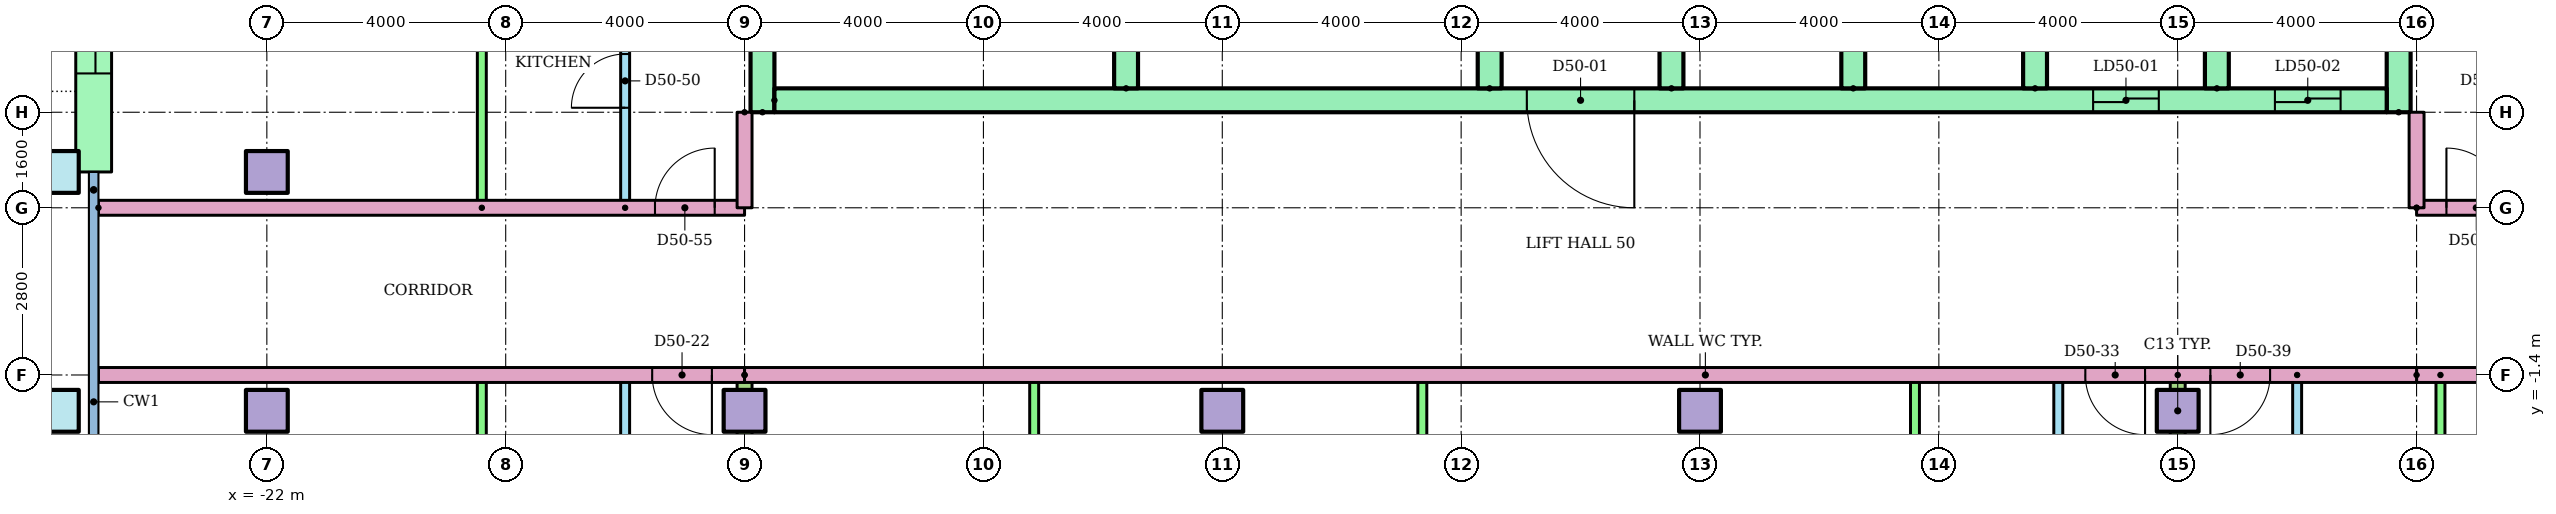
"""IFC4 building model, lengths in metres.
Left out: names, types, materials, properties, quantities, classifications, styles, units other than length and angle.
Written with IfcOpenShell. Run it as: python <this file> out.ifc"""

import sys

from ifc_helpers import new_model, si_unit, direction, frame, frame_2d, origin, origin_2d, place, context, subcontext, project, spatial, rectangle, hollow_rectangle, extrude, element, fill, save


model = new_model("IFC4")
c1 = context("Model", 3, precision=1e-05, world=origin(), true_north=direction((0.0, 1.0)))
c2 = subcontext(c1, "Body", "Model", "MODEL_VIEW")
j1 = project(units=[si_unit("LENGTHUNIT", "METRE"), si_unit("PLANEANGLEUNIT", "RADIAN")], contexts=[c1])
p1 = place(None, origin())
s1 = spatial("IfcSite", under=j1, at=p1, CompositionType="ELEMENT")
p2 = place(p1, origin())
s2 = spatial("IfcBuilding", under=s1, at=p2, CompositionType="ELEMENT")
p3 = place(p2, frame((0.0, 0.0, 190.9)))
s3 = spatial("IfcBuildingStorey", under=s2, at=p3, CompositionType="ELEMENT", Elevation=190.9)
p4 = place(p3, frame((-25.5, -2.0, 0.0)))
e1 = element("IfcColumn", 1, at=p4, inside=s3, PredefinedType="COLUMN", context=c2, shape_type="SweptSolid", body=[
    extrude(hollow_rectangle(XDim=0.7, YDim=0.7, WallThickness=0.036, at=origin_2d()), origin(), (0.0, 0.0, 1.0), 3.2),
])
for number, where in (
    (2, (-22.0, -2.0, 0.0)),
    (3, (-14.0, -2.0, 0.0)),
    (4, (-6.0, -2.0, 0.0)),
    (5, (2.0, -2.0, 0.0)),
    (6, (10.0, -2.0, 0.0)),
):
    element("IfcColumn", number, at=place(p3, frame(where)), inside=s3, PredefinedType="COLUMN", context=c2, shape_type="SweptSolid", body=[
        extrude(rectangle(XDim=0.7, YDim=0.7, at=origin_2d()), origin(), (0.0, 0.0, 1.0), 3.2),
    ])
p5 = place(p3, frame((-25.5, 2.0, 0.0)))
e7 = element("IfcColumn", 7, at=p5, inside=s3, PredefinedType="COLUMN", context=c2, shape_type="SweptSolid", body=[
    extrude(hollow_rectangle(XDim=0.7, YDim=0.7, WallThickness=0.036, at=origin_2d()), origin(), (0.0, 0.0, 1.0), 3.2),
])
p6 = place(p3, frame((-22.0, 2.0, 0.0)))
e8 = element("IfcColumn", 8, at=p6, inside=s3, PredefinedType="COLUMN", context=c2, shape_type="SweptSolid", body=[
    extrude(rectangle(XDim=0.7, YDim=0.7, at=origin_2d()), origin(), (0.0, 0.0, 1.0), 3.2),
])
p7 = place(p3, frame((-24.9, 6.5, 0.0), z_axis=(0.0, 0.0, 1.0), x_axis=(0.0, -1.0, 0.0)))
e9 = element("IfcWall", 9, at=p7, inside=s3, PredefinedType="STANDARD", context=c2, shape_type="SweptSolid", body=[
    extrude(rectangle(XDim=4.5, YDim=0.6, at=frame_2d((2.25, 0.0))), origin(), (0.0, 0.0, 1.0), 2.8),
])
p8 = place(p7, frame((1.65, 0.0, 0.0)))
e10 = element("IfcOpeningElement", 10, at=p8, cuts=e9, PredefinedType="OPENING", context=c2, shape_type="SweptSolid", body=[
    extrude(rectangle(XDim=1.2, YDim=2.1, at=frame_2d((0.6, 1.05))), frame((0.0, 0.31, 0.0), z_axis=(0.0, -1.0, 0.0), x_axis=(1.0, 0.0, 0.0)), (0.0, 0.0, 1.0), 0.62),
])
for number, where, z_axis, x_axis in (
    (11, (-13.7, 3.0, 0.0), (0.0, 0.0, 1.0), (0.0, 1.0, 0.0)),
    (12, (13.7, 3.0, 0.0), (0.0, 0.0, 1.0), (0.0, 1.0, 0.0)),
):
    element("IfcWall", number, at=place(p3, frame(where, z_axis=z_axis, x_axis=x_axis)), inside=s3, PredefinedType="SHEAR", context=c2, shape_type="SweptSolid", body=[
        extrude(rectangle(XDim=17.0, YDim=0.4, at=frame_2d((8.5, 0.0))), origin(), (0.0, 0.0, 1.0), 2.8),
    ])
p9 = place(p3, frame((-13.5, 3.2, 0.0)))
e13 = element("IfcWall", 13, at=p9, inside=s3, PredefinedType="SHEAR", context=c2, shape_type="SweptSolid", body=[
    extrude(rectangle(XDim=27.0, YDim=0.4, at=frame_2d((13.5, 0.0))), origin(), (0.0, 0.0, 1.0), 2.8),
])
p10 = place(p9, frame((22.083, 0.0, 0.0)))
e14 = element("IfcOpeningElement", 14, at=p10, cuts=e13, PredefinedType="OPENING", context=c2, shape_type="SweptSolid", body=[
    extrude(rectangle(XDim=1.1, YDim=2.1, at=frame_2d((0.55, 1.05))), frame((0.0, 0.21, 0.0), z_axis=(0.0, -1.0, 0.0), x_axis=(1.0, 0.0, 0.0)), (0.0, 0.0, 1.0), 0.42),
])
p11 = place(p9, frame((25.128, 0.0, 0.0)))
e15 = element("IfcOpeningElement", 15, at=p11, cuts=e13, PredefinedType="OPENING", context=c2, shape_type="SweptSolid", body=[
    extrude(rectangle(XDim=1.1, YDim=2.1, at=frame_2d((0.55, 1.05))), frame((0.0, 0.21, 0.0), z_axis=(0.0, -1.0, 0.0), x_axis=(1.0, 0.0, 0.0)), (0.0, 0.0, 1.0), 0.42),
])
p12 = place(p9, frame((12.6, 0.0, 0.0)))
e16 = element("IfcOpeningElement", 16, at=p12, cuts=e13, PredefinedType="OPENING", context=c2, shape_type="SweptSolid", body=[
    extrude(rectangle(XDim=1.8, YDim=2.1, at=frame_2d((0.9, 1.05))), frame((0.0, 0.21, 0.0), z_axis=(0.0, -1.0, 0.0), x_axis=(1.0, 0.0, 0.0)), (0.0, 0.0, 1.0), 0.42),
])
for number, where, z_axis, x_axis in (
    (17, (-7.611, 3.4, 0.0), (0.0, 0.0, 1.0), (0.0, 1.0, 0.0)),
    (18, (-1.522, 3.4, 0.0), (0.0, 0.0, 1.0), (0.0, 1.0, 0.0)),
    (19, (1.522, 3.4, 0.0), (0.0, 0.0, 1.0), (0.0, 1.0, 0.0)),
    (20, (4.567, 3.4, 0.0), (0.0, 0.0, 1.0), (0.0, 1.0, 0.0)),
    (21, (7.611, 3.4, 0.0), (0.0, 0.0, 1.0), (0.0, 1.0, 0.0)),
    (22, (10.656, 3.4, 0.0), (0.0, 0.0, 1.0), (0.0, 1.0, 0.0)),
):
    element("IfcWall", number, at=place(p3, frame(where, z_axis=z_axis, x_axis=x_axis)), inside=s3, PredefinedType="SHEAR", context=c2, shape_type="SweptSolid", body=[
        extrude(rectangle(XDim=3.0, YDim=0.4, at=frame_2d((1.5, 0.0))), origin(), (0.0, 0.0, 1.0), 2.8),
    ])
p13 = place(p3, frame((-16.0, -6.9, 0.0), z_axis=(0.0, 0.0, 1.0), x_axis=(0.0, 1.0, 0.0)))
e23 = element("IfcWall", 23, at=p13, inside=s3, PredefinedType="PARTITIONING", context=c2, shape_type="SweptSolid", body=[
    extrude(rectangle(XDim=5.5, YDim=0.15, at=frame_2d((2.75, 0.0))), origin(), (0.0, 0.0, 1.0), 2.4),
])
p14 = place(p13, frame((3.55, 0.0, 0.0)))
e24 = element("IfcOpeningElement", 24, at=p14, cuts=e23, PredefinedType="OPENING", context=c2, shape_type="SweptSolid", body=[
    extrude(rectangle(XDim=0.9, YDim=2.1, at=frame_2d((0.45, 1.05))), frame((0.0, 0.085, 0.0), z_axis=(0.0, -1.0, 0.0), x_axis=(1.0, 0.0, 0.0)), (0.0, 0.0, 1.0), 0.17),
])
p15 = place(p13, frame((0.85, 0.0, 0.0)))
e25 = element("IfcOpeningElement", 25, at=p15, cuts=e23, PredefinedType="OPENING", context=c2, shape_type="SweptSolid", body=[
    extrude(rectangle(XDim=0.8, YDim=2.1, at=frame_2d((0.4, 1.05))), frame((0.0, 0.085, 0.0), z_axis=(0.0, -1.0, 0.0), x_axis=(1.0, 0.0, 0.0)), (0.0, 0.0, 1.0), 0.17),
])
p16 = place(p3, frame((-18.4, -6.9, 0.0), z_axis=(0.0, 0.0, 1.0), x_axis=(0.0, 1.0, 0.0)))
e26 = element("IfcWall", 26, at=p16, inside=s3, PredefinedType="PARTITIONING", context=c2, shape_type="SweptSolid", body=[
    extrude(rectangle(XDim=5.5, YDim=0.15, at=frame_2d((2.75, 0.0))), origin(), (0.0, 0.0, 1.0), 2.4),
])
p17 = place(p3, frame((8.0, -6.9, 0.0), z_axis=(0.0, 0.0, 1.0), x_axis=(0.0, 1.0, 0.0)))
e27 = element("IfcWall", 27, at=p17, inside=s3, PredefinedType="PARTITIONING", context=c2, shape_type="SweptSolid", body=[
    extrude(rectangle(XDim=5.5, YDim=0.15, at=frame_2d((2.75, 0.0))), origin(), (0.0, 0.0, 1.0), 2.4),
])
p18 = place(p17, frame((3.55, 0.0, 0.0)))
e28 = element("IfcOpeningElement", 28, at=p18, cuts=e27, PredefinedType="OPENING", context=c2, shape_type="SweptSolid", body=[
    extrude(rectangle(XDim=0.9, YDim=2.1, at=frame_2d((0.45, 1.05))), frame((0.0, 0.085, 0.0), z_axis=(0.0, -1.0, 0.0), x_axis=(1.0, 0.0, 0.0)), (0.0, 0.0, 1.0), 0.17),
])
p19 = place(p17, frame((0.85, 0.0, 0.0)))
e29 = element("IfcOpeningElement", 29, at=p19, cuts=e27, PredefinedType="OPENING", context=c2, shape_type="SweptSolid", body=[
    extrude(rectangle(XDim=0.8, YDim=2.1, at=frame_2d((0.4, 1.05))), frame((0.0, 0.085, 0.0), z_axis=(0.0, -1.0, 0.0), x_axis=(1.0, 0.0, 0.0)), (0.0, 0.0, 1.0), 0.17),
])
for number, where, z_axis, x_axis in (
    (30, (5.6, -6.9, 0.0), (0.0, 0.0, 1.0), (0.0, 1.0, 0.0)),
    (31, (-2.65, -6.9, 0.0), (0.0, 0.0, 1.0), (0.0, 1.0, 0.0)),
    (32, (-9.15, -6.9, 0.0), (0.0, 0.0, 1.0), (0.0, 1.0, 0.0)),
):
    element("IfcWall", number, at=place(p3, frame(where, z_axis=z_axis, x_axis=x_axis)), inside=s3, PredefinedType="PARTITIONING", context=c2, shape_type="SweptSolid", body=[
        extrude(rectangle(XDim=5.5, YDim=0.15, at=frame_2d((2.75, 0.0))), origin(), (0.0, 0.0, 1.0), 2.4),
    ])
p20 = place(p3, frame((-14.0, -1.4, 0.0), z_axis=(0.0, 0.0, 1.0), x_axis=(0.0, -1.0, 0.0)))
e33 = element("IfcWall", 33, at=p20, inside=s3, PredefinedType="PARTITIONING", context=c2, shape_type="SweptSolid", body=[
    extrude(rectangle(XDim=15.01, YDim=0.25, at=frame_2d((7.505, 0.0))), origin(), (0.0, 0.0, 1.0), 2.4),
])
p21 = place(p3, frame((12.0, -1.4, 0.0), z_axis=(0.0, 0.0, 1.0), x_axis=(0.0, -1.0, 0.0)))
e34 = element("IfcWall", 34, at=p21, inside=s3, PredefinedType="PARTITIONING", context=c2, shape_type="SweptSolid", body=[
    extrude(rectangle(XDim=5.5, YDim=0.15, at=frame_2d((2.75, 0.0))), origin(), (0.0, 0.0, 1.0), 2.4),
])
p22 = place(p21, frame((1.05, 0.0, 0.0)))
e35 = element("IfcOpeningElement", 35, at=p22, cuts=e34, PredefinedType="OPENING", context=c2, shape_type="SweptSolid", body=[
    extrude(rectangle(XDim=0.9, YDim=2.1, at=frame_2d((0.45, 1.05))), frame((0.0, 0.085, 0.0), z_axis=(0.0, -1.0, 0.0), x_axis=(1.0, 0.0, 0.0)), (0.0, 0.0, 1.0), 0.17),
])
p23 = place(p21, frame((3.85, 0.0, 0.0)))
e36 = element("IfcOpeningElement", 36, at=p23, cuts=e34, PredefinedType="OPENING", context=c2, shape_type="SweptSolid", body=[
    extrude(rectangle(XDim=0.8, YDim=2.1, at=frame_2d((0.4, 1.05))), frame((0.0, 0.085, 0.0), z_axis=(0.0, -1.0, 0.0), x_axis=(1.0, 0.0, 0.0)), (0.0, 0.0, 1.0), 0.17),
])
p24 = place(p3, frame((14.4, -1.4, 0.0), z_axis=(0.0, 0.0, 1.0), x_axis=(0.0, -1.0, 0.0)))
e37 = element("IfcWall", 37, at=p24, inside=s3, PredefinedType="PARTITIONING", context=c2, shape_type="SweptSolid", body=[
    extrude(rectangle(XDim=5.5, YDim=0.15, at=frame_2d((2.75, 0.0))), origin(), (0.0, 0.0, 1.0), 2.4),
])
p25 = place(p3, frame((10.0, -1.4, 0.0), z_axis=(0.0, 0.0, 1.0), x_axis=(0.0, -1.0, 0.0)))
e38 = element("IfcWall", 38, at=p25, inside=s3, PredefinedType="PARTITIONING", context=c2, shape_type="SweptSolid", body=[
    extrude(rectangle(XDim=15.01, YDim=0.25, at=frame_2d((7.505, 0.0))), origin(), (0.0, 0.0, 1.0), 2.4),
])
p26 = place(p3, frame((-14.0, -1.4, 0.0), z_axis=(0.0, 0.0, 1.0), x_axis=(-1.0, 0.0, 0.0)))
e39 = element("IfcWall", 39, at=p26, inside=s3, PredefinedType="PARTITIONING", context=c2, shape_type="SweptSolid", body=[
    extrude(rectangle(XDim=10.82, YDim=0.25, at=frame_2d((5.41, 0.0))), origin(), (0.0, 0.0, 1.0), 2.4),
])
p27 = place(p26, frame((0.547, 0.0, 0.0)))
e40 = element("IfcOpeningElement", 40, at=p27, cuts=e39, PredefinedType="OPENING", context=c2, shape_type="SweptSolid", body=[
    extrude(rectangle(XDim=1.0, YDim=2.1, at=frame_2d((0.5, 1.05))), frame((0.0, 0.135, 0.0), z_axis=(0.0, -1.0, 0.0), x_axis=(1.0, 0.0, 0.0)), (0.0, 0.0, 1.0), 0.27),
])
p28 = place(p3, frame((29.0, -1.4, 0.0), z_axis=(0.0, 0.0, 1.0), x_axis=(-1.0, 0.0, 0.0)))
e41 = element("IfcWall", 41, at=p28, inside=s3, PredefinedType="PARTITIONING", context=c2, shape_type="SweptSolid", body=[
    extrude(rectangle(XDim=15.0, YDim=0.25, at=frame_2d((7.5, 0.0))), origin(), (0.0, 0.0, 1.0), 2.4),
])
p29 = place(p28, frame((9.453, 0.0, 0.0)))
e42 = element("IfcOpeningElement", 42, at=p29, cuts=e41, PredefinedType="OPENING", context=c2, shape_type="SweptSolid", body=[
    extrude(rectangle(XDim=1.0, YDim=2.1, at=frame_2d((0.5, 1.05))), frame((0.0, 0.135, 0.0), z_axis=(0.0, -1.0, 0.0), x_axis=(1.0, 0.0, 0.0)), (0.0, 0.0, 1.0), 0.27),
])
p30 = place(p3, frame((-16.0, 1.4, 0.0), z_axis=(0.0, 0.0, 1.0), x_axis=(0.0, 1.0, 0.0)))
e43 = element("IfcWall", 43, at=p30, inside=s3, PredefinedType="PARTITIONING", context=c2, shape_type="SweptSolid", body=[
    extrude(rectangle(XDim=7.9, YDim=0.15, at=frame_2d((3.95, 0.0))), origin(), (0.0, 0.0, 1.0), 2.4),
])
p31 = place(p30, frame((1.675, 0.0, 0.0)))
e44 = element("IfcOpeningElement", 44, at=p31, cuts=e43, PredefinedType="OPENING", context=c2, shape_type="SweptSolid", body=[
    extrude(rectangle(XDim=0.9, YDim=2.1, at=frame_2d((0.45, 1.05))), frame((0.0, 0.085, 0.0), z_axis=(0.0, -1.0, 0.0), x_axis=(1.0, 0.0, 0.0)), (0.0, 0.0, 1.0), 0.17),
])
p32 = place(p30, frame((5.675, 0.0, 0.0)))
e45 = element("IfcOpeningElement", 45, at=p32, cuts=e43, PredefinedType="OPENING", context=c2, shape_type="SweptSolid", body=[
    extrude(rectangle(XDim=0.8, YDim=2.1, at=frame_2d((0.4, 1.05))), frame((0.0, 0.085, 0.0), z_axis=(0.0, -1.0, 0.0), x_axis=(1.0, 0.0, 0.0)), (0.0, 0.0, 1.0), 0.17),
])
p33 = place(p3, frame((-18.4, 1.4, 0.0), z_axis=(0.0, 0.0, 1.0), x_axis=(0.0, 1.0, 0.0)))
e46 = element("IfcWall", 46, at=p33, inside=s3, PredefinedType="PARTITIONING", context=c2, shape_type="SweptSolid", body=[
    extrude(rectangle(XDim=7.9, YDim=0.15, at=frame_2d((3.95, 0.0))), origin(), (0.0, 0.0, 1.0), 2.4),
])
p34 = place(p3, frame((-24.82, 1.4, 0.0)))
e47 = element("IfcWall", 47, at=p34, inside=s3, PredefinedType="PARTITIONING", context=c2, shape_type="SweptSolid", body=[
    extrude(rectangle(XDim=10.82, YDim=0.25, at=frame_2d((5.41, 0.0))), origin(), (0.0, 0.0, 1.0), 2.4),
])
p35 = place(p34, frame((9.32, 0.0, 0.0)))
e48 = element("IfcOpeningElement", 48, at=p35, cuts=e47, PredefinedType="OPENING", context=c2, shape_type="SweptSolid", body=[
    extrude(rectangle(XDim=1.0, YDim=2.1, at=frame_2d((0.5, 1.05))), frame((0.0, 0.135, 0.0), z_axis=(0.0, -1.0, 0.0), x_axis=(1.0, 0.0, 0.0)), (0.0, 0.0, 1.0), 0.27),
])
p36 = place(p3, frame((14.0, 1.4, 0.0)))
e49 = element("IfcWall", 49, at=p36, inside=s3, PredefinedType="PARTITIONING", context=c2, shape_type="SweptSolid", body=[
    extrude(rectangle(XDim=15.0, YDim=0.25, at=frame_2d((7.5, 0.0))), origin(), (0.0, 0.0, 1.0), 2.4),
])
p37 = place(p36, frame((0.5, 0.0, 0.0)))
e50 = element("IfcOpeningElement", 50, at=p37, cuts=e49, PredefinedType="OPENING", context=c2, shape_type="SweptSolid", body=[
    extrude(rectangle(XDim=1.0, YDim=2.1, at=frame_2d((0.5, 1.05))), frame((0.0, 0.135, 0.0), z_axis=(0.0, -1.0, 0.0), x_axis=(1.0, 0.0, 0.0)), (0.0, 0.0, 1.0), 0.27),
])
p38 = place(p36, frame((12.547, 0.0, 0.0)))
e51 = element("IfcOpeningElement", 51, at=p38, cuts=e49, PredefinedType="OPENING", context=c2, shape_type="SweptSolid", body=[
    extrude(rectangle(XDim=1.0, YDim=2.1, at=frame_2d((0.5, 1.05))), frame((0.0, 0.135, 0.0), z_axis=(0.0, -1.0, 0.0), x_axis=(1.0, 0.0, 0.0)), (0.0, 0.0, 1.0), 0.27),
])
p39 = place(p3, frame((14.0, -1.4, 0.0), z_axis=(0.0, 0.0, 1.0), x_axis=(-1.0, 0.0, 0.0)))
e52 = element("IfcWall", 52, at=p39, inside=s3, PredefinedType="PARTITIONING", context=c2, shape_type="SweptSolid", body=[
    extrude(rectangle(XDim=28.0, YDim=0.25, at=frame_2d((14.0, 0.0))), origin(), (0.0, 0.0, 1.0), 2.4),
])
p40 = place(p39, frame((4.547, 0.0, 0.0)))
e53 = element("IfcOpeningElement", 53, at=p40, cuts=e52, PredefinedType="OPENING", context=c2, shape_type="SweptSolid", body=[
    extrude(rectangle(XDim=1.0, YDim=2.1, at=frame_2d((0.5, 1.05))), frame((0.0, 0.135, 0.0), z_axis=(0.0, -1.0, 0.0), x_axis=(1.0, 0.0, 0.0)), (0.0, 0.0, 1.0), 0.27),
])
p41 = place(p39, frame((2.453, 0.0, 0.0)))
e54 = element("IfcOpeningElement", 54, at=p41, cuts=e52, PredefinedType="OPENING", context=c2, shape_type="SweptSolid", body=[
    extrude(rectangle(XDim=1.0, YDim=2.1, at=frame_2d((0.5, 1.05))), frame((0.0, 0.135, 0.0), z_axis=(0.0, -1.0, 0.0), x_axis=(1.0, 0.0, 0.0)), (0.0, 0.0, 1.0), 0.27),
])
for number, where, z_axis, x_axis in (
    (55, (-14.0, 3.0, 0.0), (0.0, 0.0, 1.0), (0.0, -1.0, 0.0)),
    (56, (14.0, 1.4, 0.0), (0.0, 0.0, 1.0), (0.0, 1.0, 0.0)),
):
    element("IfcWall", number, at=place(p3, frame(where, z_axis=z_axis, x_axis=x_axis)), inside=s3, PredefinedType="PARTITIONING", context=c2, shape_type="SweptSolid", body=[
        extrude(rectangle(XDim=1.6, YDim=0.25, at=frame_2d((0.8, 0.0))), origin(), (0.0, 0.0, 1.0), 2.4),
    ])
p42 = place(p10, origin())
e57 = element("IfcDoor", 57, at=p42, inside=s3, OperationType="SLIDING_TO_LEFT", PredefinedType="DOOR", context=c2, shape_type="SweptSolid", body=[
    extrude(rectangle(XDim=1.1, YDim=2.1, at=frame_2d((0.55, 1.05))), frame((0.0, 0.025, 0.0), z_axis=(0.0, -1.0, 0.0), x_axis=(1.0, 0.0, 0.0)), (0.0, 0.0, 1.0), 0.05),
])
fill(e14, e57)
p43 = place(p11, origin())
e58 = element("IfcDoor", 58, at=p43, inside=s3, OperationType="SLIDING_TO_LEFT", PredefinedType="DOOR", context=c2, shape_type="SweptSolid", body=[
    extrude(rectangle(XDim=1.1, YDim=2.1, at=frame_2d((0.55, 1.05))), frame((0.0, 0.025, 0.0), z_axis=(0.0, -1.0, 0.0), x_axis=(1.0, 0.0, 0.0)), (0.0, 0.0, 1.0), 0.05),
])
fill(e15, e58)
p44 = place(p12, frame((1.8, 0.0, 0.0), z_axis=(0.0, 0.0, 1.0), x_axis=(-1.0, 0.0, 0.0)))
e59 = element("IfcDoor", 59, at=p44, inside=s3, OperationType="DOUBLE_DOOR_SINGLE_SWING", PredefinedType="DOOR", context=c2, shape_type="SweptSolid", body=[
    extrude(rectangle(XDim=1.8, YDim=2.1, at=frame_2d((0.9, 1.05))), frame((0.0, 0.025, 0.0), z_axis=(0.0, -1.0, 0.0), x_axis=(1.0, 0.0, 0.0)), (0.0, 0.0, 1.0), 0.05),
])
fill(e16, e59)
p45 = place(p27, origin())
e60 = element("IfcDoor", 60, at=p45, inside=s3, OperationType="SINGLE_SWING_LEFT", PredefinedType="DOOR", context=c2, shape_type="SweptSolid", body=[
    extrude(rectangle(XDim=1.0, YDim=2.1, at=frame_2d((0.5, 1.05))), frame((0.0, 0.025, 0.0), z_axis=(0.0, -1.0, 0.0), x_axis=(1.0, 0.0, 0.0)), (0.0, 0.0, 1.0), 0.05),
])
fill(e40, e60)
p46 = place(p40, origin())
e61 = element("IfcDoor", 61, at=p46, inside=s3, OperationType="SINGLE_SWING_LEFT", PredefinedType="DOOR", context=c2, shape_type="SweptSolid", body=[
    extrude(rectangle(XDim=1.0, YDim=2.1, at=frame_2d((0.5, 1.05))), frame((0.0, 0.025, 0.0), z_axis=(0.0, -1.0, 0.0), x_axis=(1.0, 0.0, 0.0)), (0.0, 0.0, 1.0), 0.05),
])
fill(e53, e61)
p47 = place(p41, origin())
e62 = element("IfcDoor", 62, at=p47, inside=s3, OperationType="SINGLE_SWING_RIGHT", PredefinedType="DOOR", context=c2, shape_type="SweptSolid", body=[
    extrude(rectangle(XDim=1.0, YDim=2.1, at=frame_2d((0.5, 1.05))), frame((0.0, 0.025, 0.0), z_axis=(0.0, -1.0, 0.0), x_axis=(1.0, 0.0, 0.0)), (0.0, 0.0, 1.0), 0.05),
])
fill(e54, e62)
p48 = place(p31, origin())
e63 = element("IfcDoor", 63, at=p48, inside=s3, OperationType="SINGLE_SWING_LEFT", PredefinedType="DOOR", context=c2, shape_type="SweptSolid", body=[
    extrude(rectangle(XDim=0.9, YDim=2.1, at=frame_2d((0.45, 1.05))), frame((0.0, 0.025, 0.0), z_axis=(0.0, -1.0, 0.0), x_axis=(1.0, 0.0, 0.0)), (0.0, 0.0, 1.0), 0.05),
])
fill(e44, e63)
p49 = place(p35, origin())
e64 = element("IfcDoor", 64, at=p49, inside=s3, OperationType="SINGLE_SWING_RIGHT", PredefinedType="DOOR", context=c2, shape_type="SweptSolid", body=[
    extrude(rectangle(XDim=1.0, YDim=2.1, at=frame_2d((0.5, 1.05))), frame((0.0, 0.025, 0.0), z_axis=(0.0, -1.0, 0.0), x_axis=(1.0, 0.0, 0.0)), (0.0, 0.0, 1.0), 0.05),
])
fill(e48, e64)
p50 = place(p37, origin())
e65 = element("IfcDoor", 65, at=p50, inside=s3, OperationType="SINGLE_SWING_LEFT", PredefinedType="DOOR", context=c2, shape_type="SweptSolid", body=[
    extrude(rectangle(XDim=1.0, YDim=2.1, at=frame_2d((0.5, 1.05))), frame((0.0, 0.025, 0.0), z_axis=(0.0, -1.0, 0.0), x_axis=(1.0, 0.0, 0.0)), (0.0, 0.0, 1.0), 0.05),
])
fill(e50, e65)
p51 = place(p8, origin())
e66 = element("IfcDoor", 66, at=p51, inside=s3, OperationType="SLIDING_TO_LEFT", PredefinedType="DOOR", context=c2, shape_type="SweptSolid", body=[
    extrude(rectangle(XDim=1.2, YDim=2.1, at=frame_2d((0.6, 1.05))), frame((0.0, 0.025, 0.0), z_axis=(0.0, -1.0, 0.0), x_axis=(1.0, 0.0, 0.0)), (0.0, 0.0, 1.0), 0.05),
])
fill(e10, e66)
save(model, sys.argv[1])
